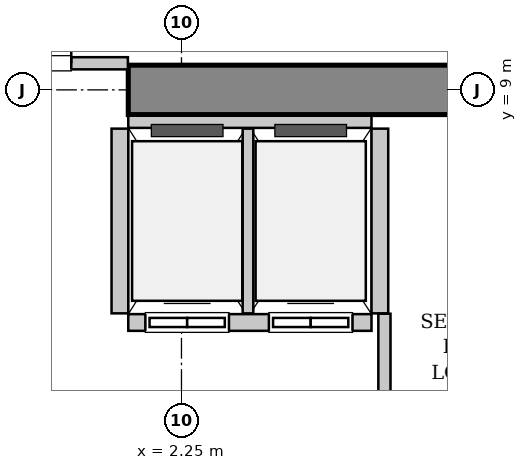
"""IFC4 building model, lengths in metres.
Left out: names, types, materials, properties, quantities, classifications, styles, units other than length and angle.
Written with IfcOpenShell. Run it as: python <this file> out.ifc"""

import sys

from ifc_helpers import new_model, si_unit, direction, frame, frame_2d, origin, place, context, subcontext, project, spatial, rectangle, extrude, source, transform, mapped, element, fill, save


model = new_model("IFC4")
c1 = context("Model", 3, precision=1e-05, world=origin(), true_north=direction((0.0, 1.0)))
c2 = subcontext(c1, "Body", "Model", "MODEL_VIEW")
j1 = project(units=[si_unit("LENGTHUNIT", "METRE"), si_unit("PLANEANGLEUNIT", "RADIAN")], contexts=[c1])
p1 = place(None, origin())
s1 = spatial("IfcSite", under=j1, at=p1, CompositionType="ELEMENT")
p2 = place(p1, origin())
s2 = spatial("IfcBuilding", under=s1, at=p2, CompositionType="ELEMENT")
p3 = place(p2, frame((0.0, 0.0, 11.4)))
s3 = spatial("IfcBuildingStorey", under=s2, at=p3, CompositionType="ELEMENT", Elevation=11.4)
m1 = source(origin(), c2, "Body", "SweptSolid", [
    extrude(rectangle(XDim=10.025, YDim=0.65, at=frame_2d((5.012, 0.0))), origin(), (0.0, 0.0, 1.0), 5.4),
])
p4 = place(p3, frame((1.55, 9.0, 0.0), z_axis=(0.0, 0.0, 1.0), x_axis=(1.0, 0.0, 0.0)))
e1 = element("IfcWall", 1, at=p4, inside=s3, PredefinedType="SHEAR", context=c2, shape_type="MappedRepresentation", body=[
    mapped(m1, transform((0.0, 0.0, 0.0), x_axis=(1.0, 0.0, 0.0), y_axis=(0.0, 1.0, 0.0), z_axis=(0.0, 0.0, 1.0), scale=1.0)),
])
m2 = source(origin(), c2, "Body", "SweptSolid", [
    extrude(rectangle(XDim=3.2, YDim=0.22, at=frame_2d((1.6, 0.0))), origin(), (0.0, 0.0, 1.0), 5.085),
])
p5 = place(p3, frame((1.55, 5.94, 0.0), z_axis=(0.0, 0.0, 1.0), x_axis=(1.0, 0.0, 0.0)))
e2 = element("IfcWall", 2, at=p5, inside=s3, PredefinedType="SOLIDWALL", context=c2, shape_type="MappedRepresentation", body=[
    mapped(m2, transform((0.0, 0.0, 0.0), x_axis=(1.0, 0.0, 0.0), y_axis=(0.0, 1.0, 0.0), z_axis=(0.0, 0.0, 1.0), scale=1.0)),
])
p6 = place(p5, frame((0.225, 0.0, 0.0)))
e3 = element("IfcOpeningElement", 3, at=p6, cuts=e2, PredefinedType="OPENING", context=c2, shape_type="SweptSolid", body=[
    extrude(rectangle(XDim=1.1, YDim=2.2, at=frame_2d((0.55, 1.1))), frame((0.0, 0.12, 0.0), z_axis=(0.0, -1.0, 0.0), x_axis=(1.0, 0.0, 0.0)), (0.0, 0.0, 1.0), 0.24),
])
p7 = place(p5, frame((1.85, 0.0, 0.0)))
e4 = element("IfcOpeningElement", 4, at=p7, cuts=e2, PredefinedType="OPENING", context=c2, shape_type="SweptSolid", body=[
    extrude(rectangle(XDim=1.1, YDim=2.2, at=frame_2d((0.55, 1.1))), frame((0.0, 0.12, 0.0), z_axis=(0.0, -1.0, 0.0), x_axis=(1.0, 0.0, 0.0)), (0.0, 0.0, 1.0), 0.24),
])
m3 = source(origin(), c2, "Body", "SweptSolid", [
    extrude(rectangle(XDim=3.2, YDim=0.16, at=frame_2d((1.6, 0.0))), origin(), (0.0, 0.0, 1.0), 3.975),
])
p8 = place(p3, frame((4.75, 8.58, 0.0), z_axis=(0.0, 0.0, 1.0), x_axis=(-1.0, 0.0, 0.0)))
e5 = element("IfcWall", 5, at=p8, inside=s3, PredefinedType="PARTITIONING", context=c2, shape_type="MappedRepresentation", body=[
    mapped(m3, transform((0.0, 0.0, 0.0), x_axis=(1.0, 0.0, 0.0), y_axis=(0.0, 1.0, 0.0), z_axis=(0.0, 0.0, 1.0), scale=1.0)),
])
m4 = source(origin(), c2, "Body", "SweptSolid", [
    extrude(rectangle(XDim=2.43, YDim=0.22, at=frame_2d((1.215, 0.0))), origin(), (0.0, 0.0, 1.0), 5.085),
])
p9 = place(p3, frame((1.44, 8.49, 0.0), z_axis=(0.0, 0.0, 1.0), x_axis=(0.0, -1.0, 0.0)))
e6 = element("IfcWall", 6, at=p9, inside=s3, PredefinedType="SOLIDWALL", context=c2, shape_type="MappedRepresentation", body=[
    mapped(m4, transform((0.0, 0.0, 0.0), x_axis=(1.0, 0.0, 0.0), y_axis=(0.0, 1.0, 0.0), z_axis=(0.0, 0.0, 1.0), scale=1.0)),
])
m5 = source(origin(), c2, "Body", "SweptSolid", [
    extrude(rectangle(XDim=2.43, YDim=0.14, at=frame_2d((1.215, 0.0))), origin(), (0.0, 0.0, 1.0), 5.085),
])
p10 = place(p3, frame((3.125, 6.06, 0.0), z_axis=(0.0, 0.0, 1.0), x_axis=(0.0, 1.0, 0.0)))
e7 = element("IfcWall", 7, at=p10, inside=s3, PredefinedType="PARTITIONING", context=c2, shape_type="MappedRepresentation", body=[
    mapped(m5, transform((0.0, 0.0, 0.0), x_axis=(1.0, 0.0, 0.0), y_axis=(0.0, 1.0, 0.0), z_axis=(0.0, 0.0, 1.0), scale=1.0)),
])
p11 = place(p3, frame((4.86, 6.06, 0.0), z_axis=(0.0, 0.0, 1.0), x_axis=(0.0, 1.0, 0.0)))
e8 = element("IfcWall", 8, at=p11, inside=s3, PredefinedType="SOLIDWALL", context=c2, shape_type="MappedRepresentation", body=[
    mapped(m4, transform((0.0, 0.0, 0.0), x_axis=(1.0, 0.0, 0.0), y_axis=(0.0, 1.0, 0.0), z_axis=(0.0, 0.0, 1.0), scale=1.0)),
])
m6 = source(origin(), c2, "Body", "SweptSolid", [
    extrude(rectangle(XDim=3.09, YDim=0.16, at=frame_2d((1.545, 0.0))), origin(), (0.0, 0.0, 1.0), 3.975),
])
p12 = place(p3, frame((-1.545, 9.35, 0.0), z_axis=(0.0, 0.0, 1.0), x_axis=(1.0, 0.0, 0.0)))
e9 = element("IfcWall", 9, at=p12, inside=s3, PredefinedType="PARTITIONING", context=c2, shape_type="MappedRepresentation", body=[
    mapped(m6, transform((0.0, 0.0, 0.0), x_axis=(1.0, 0.0, 0.0), y_axis=(0.0, 1.0, 0.0), z_axis=(0.0, 0.0, 1.0), scale=1.0)),
])
p13 = place(p12, frame((0.745, 0.0, 0.0)))
e10 = element("IfcOpeningElement", 10, at=p13, cuts=e9, PredefinedType="OPENING", context=c2, shape_type="SweptSolid", body=[
    extrude(rectangle(XDim=1.6, YDim=2.3, at=frame_2d((0.8, 1.15))), frame((0.0, 0.09, 0.0), z_axis=(0.0, -1.0, 0.0), x_axis=(1.0, 0.0, 0.0)), (0.0, 0.0, 1.0), 0.18),
])
m7 = source(origin(), c2, "Body", "SweptSolid", [
    extrude(rectangle(XDim=3.015, YDim=0.16, at=frame_2d((1.507, 0.0))), origin(), (0.0, 0.0, 1.0), 5.085),
])
p14 = place(p3, frame((4.92, 3.04, 0.0), z_axis=(0.0, 0.0, 1.0), x_axis=(0.0, 1.0, 0.0)))
e11 = element("IfcWall", 11, at=p14, inside=s3, PredefinedType="PARTITIONING", context=c2, shape_type="MappedRepresentation", body=[
    mapped(m7, transform((0.0, 0.0, 0.0), x_axis=(1.0, 0.0, 0.0), y_axis=(0.0, 1.0, 0.0), z_axis=(0.0, 0.0, 1.0), scale=1.0)),
])
m8 = source(origin(), c2, "Body", "SweptSolid", [
    extrude(rectangle(XDim=1.1, YDim=2.2, at=frame_2d((0.55, 1.1))), frame((0.0, 0.025, 0.0), z_axis=(0.0, -1.0, 0.0), x_axis=(1.0, 0.0, 0.0)), (0.0, 0.0, 1.0), 0.05),
])
p15 = place(p6, origin())
e12 = element("IfcDoor", 12, at=p15, inside=s3, OperationType="DOUBLE_DOOR_SLIDING", PredefinedType="DOOR", context=c2, shape_type="MappedRepresentation", body=[
    mapped(m8, transform((0.0, 0.0, 0.0), x_axis=(1.0, 0.0, 0.0), y_axis=(0.0, 1.0, 0.0), z_axis=(0.0, 0.0, 1.0), scale=1.0)),
])
fill(e3, e12)
p16 = place(p7, origin())
e13 = element("IfcDoor", 13, at=p16, inside=s3, OperationType="DOUBLE_DOOR_SLIDING", PredefinedType="DOOR", context=c2, shape_type="MappedRepresentation", body=[
    mapped(m8, transform((0.0, 0.0, 0.0), x_axis=(1.0, 0.0, 0.0), y_axis=(0.0, 1.0, 0.0), z_axis=(0.0, 0.0, 1.0), scale=1.0)),
])
fill(e4, e13)
m9 = source(origin(), c2, "Body", "SweptSolid", [
    extrude(rectangle(XDim=1.6, YDim=2.3, at=frame_2d((0.8, 1.15))), frame((0.0, 0.025, 0.0), z_axis=(0.0, -1.0, 0.0), x_axis=(1.0, 0.0, 0.0)), (0.0, 0.0, 1.0), 0.05),
])
p17 = place(p13, origin())
e14 = element("IfcDoor", 14, at=p17, inside=s3, OperationType="DOUBLE_DOOR_SINGLE_SWING", PredefinedType="DOOR", context=c2, shape_type="MappedRepresentation", body=[
    mapped(m9, transform((0.0, 0.0, 0.0), x_axis=(1.0, 0.0, 0.0), y_axis=(0.0, 1.0, 0.0), z_axis=(0.0, 0.0, 1.0), scale=1.0)),
])
fill(e10, e14)
save(model, sys.argv[1])
